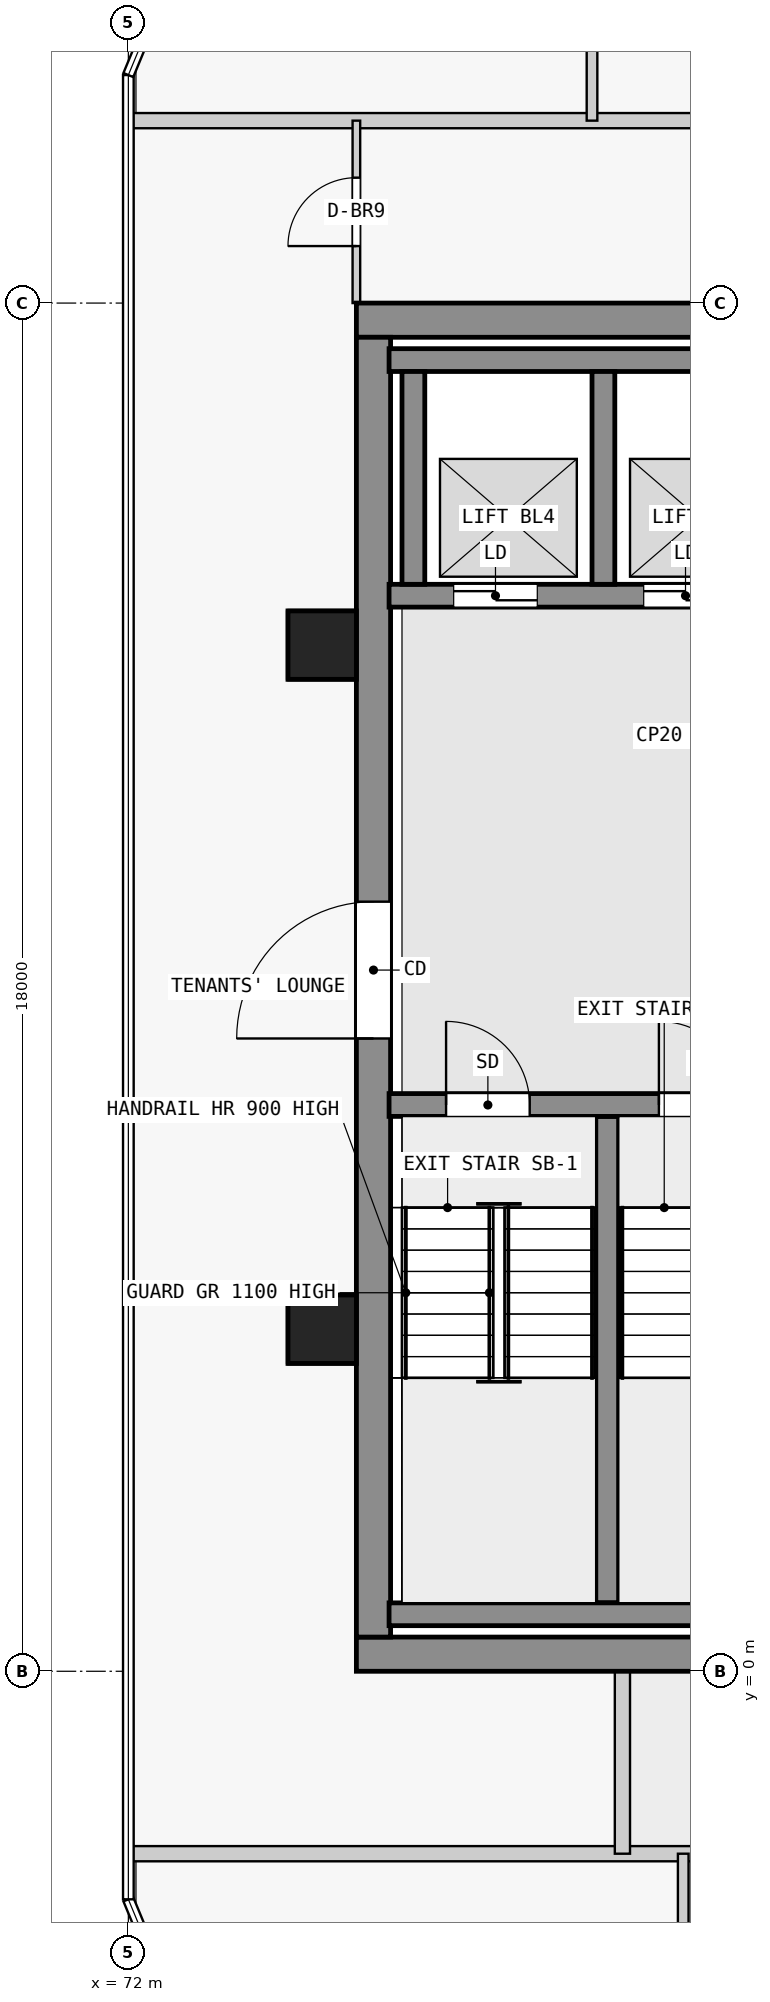
"""IFC4 building model, lengths in metres.
Left out: names, types, materials, properties, quantities, classifications, styles, units other than length and angle.
Written with IfcOpenShell. Run it as: python <this file> out.ifc"""

import sys

from ifc_helpers import new_model, si_unit, direction, frame, frame_2d, origin, origin_2d, place, context, subcontext, project, spatial, rectangle, extrude, element, fill, save


model = new_model("IFC4")
c1 = context("Model", 3, precision=1e-05, world=origin(), true_north=direction((0.0, 1.0)))
c2 = subcontext(c1, "Body", "Model", "MODEL_VIEW")
j1 = project(units=[si_unit("LENGTHUNIT", "METRE"), si_unit("PLANEANGLEUNIT", "RADIAN")], contexts=[c1])
p1 = place(None, origin())
s1 = spatial("IfcSite", under=j1, at=p1, CompositionType="ELEMENT")
p2 = place(p1, origin())
s2 = spatial("IfcBuilding", under=s1, at=p2, CompositionType="ELEMENT")
p3 = place(p2, frame((0.0, 0.0, 72.3)))
s3 = spatial("IfcBuildingStorey", under=s2, at=p3, CompositionType="ELEMENT", Elevation=72.3)
for number, where, z_axis, x_axis in (
    (1, (74.55, 13.5, 0.0), (0.0, 0.0, 1.0), (1.0, 0.0, 0.0)),
    (2, (74.55, 4.5, 0.0), (0.0, 0.0, 1.0), (1.0, 0.0, 0.0)),
):
    element("IfcColumn", number, at=place(p3, frame(where, z_axis=z_axis, x_axis=x_axis)), inside=s3, PredefinedType="COLUMN", context=c2, shape_type="SweptSolid", body=[
        extrude(rectangle(XDim=0.9, YDim=0.9, at=origin_2d()), origin(), (0.0, 0.0, 1.0), 6.0),
    ])
for number, where, z_axis, x_axis in (
    (3, (75.0, 0.225, 0.0), (0.0, 0.0, 1.0), (1.0, 0.0, 0.0)),
    (4, (75.0, 17.775, 0.0), (0.0, 0.0, 1.0), (1.0, 0.0, 0.0)),
):
    element("IfcWall", number, at=place(p3, frame(where, z_axis=z_axis, x_axis=x_axis)), inside=s3, PredefinedType="SHEAR", context=c2, shape_type="SweptSolid", body=[
        extrude(rectangle(XDim=14.5, YDim=0.45, at=frame_2d((7.25, 0.0))), origin(), (0.0, 0.0, 1.0), 5.75),
    ])
p4 = place(p3, frame((75.225, 0.45, 0.0), z_axis=(0.0, 0.0, 1.0), x_axis=(0.0, 1.0, 0.0)))
e5 = element("IfcWall", 5, at=p4, inside=s3, PredefinedType="SHEAR", context=c2, shape_type="SweptSolid", body=[
    extrude(rectangle(XDim=17.1, YDim=0.45, at=frame_2d((8.55, 0.0))), origin(), (0.0, 0.0, 1.0), 5.75),
])
p5 = place(p4, frame((7.875, 0.0, 0.0)))
e6 = element("IfcOpeningElement", 6, at=p5, cuts=e5, PredefinedType="OPENING", context=c2, shape_type="SweptSolid", body=[
    extrude(rectangle(XDim=1.8, YDim=2.1, at=frame_2d((0.9, 1.05))), frame((0.0, 0.235, 0.0), z_axis=(0.0, -1.0, 0.0), x_axis=(1.0, 0.0, 0.0)), (0.0, 0.0, 1.0), 0.47),
])
p6 = place(p3, frame((75.43, 0.75, 0.0), z_axis=(0.0, 0.0, 1.0), x_axis=(1.0, 0.0, 0.0)))
e7 = element("IfcWall", 7, at=p6, inside=s3, PredefinedType="SHEAR", context=c2, shape_type="SweptSolid", body=[
    extrude(rectangle(XDim=5.87, YDim=0.3, at=frame_2d((2.935, 0.0))), origin(), (0.0, 0.0, 1.0), 5.75),
])
p7 = place(p3, frame((75.43, 7.45, 0.0), z_axis=(0.0, 0.0, 1.0), x_axis=(1.0, 0.0, 0.0)))
e8 = element("IfcWall", 8, at=p7, inside=s3, PredefinedType="SHEAR", context=c2, shape_type="SweptSolid", body=[
    extrude(rectangle(XDim=5.87, YDim=0.3, at=frame_2d((2.935, 0.0))), origin(), (0.0, 0.0, 1.0), 5.75),
])
p8 = place(p7, frame((0.75, 0.0, 0.0)))
e9 = element("IfcOpeningElement", 9, at=p8, cuts=e8, PredefinedType="OPENING", context=c2, shape_type="SweptSolid", body=[
    extrude(rectangle(XDim=1.1, YDim=2.1, at=frame_2d((0.55, 1.05))), frame((0.0, 0.16, 0.0), z_axis=(0.0, -1.0, 0.0), x_axis=(1.0, 0.0, 0.0)), (0.0, 0.0, 1.0), 0.32),
])
p9 = place(p7, frame((3.55, 0.0, 0.0)))
e10 = element("IfcOpeningElement", 10, at=p9, cuts=e8, PredefinedType="OPENING", context=c2, shape_type="SweptSolid", body=[
    extrude(rectangle(XDim=1.1, YDim=2.1, at=frame_2d((0.55, 1.05))), frame((0.0, 0.16, 0.0), z_axis=(0.0, -1.0, 0.0), x_axis=(1.0, 0.0, 0.0)), (0.0, 0.0, 1.0), 0.32),
])
p10 = place(p3, frame((78.3, 0.9, 0.0), z_axis=(0.0, 0.0, 1.0), x_axis=(0.0, 1.0, 0.0)))
e11 = element("IfcWall", 11, at=p10, inside=s3, PredefinedType="SHEAR", context=c2, shape_type="SweptSolid", body=[
    extrude(rectangle(XDim=6.4, YDim=0.3, at=frame_2d((3.2, 0.0))), origin(), (0.0, 0.0, 1.0), 5.75),
])
p11 = place(p3, frame((75.43, 17.25, 0.0), z_axis=(0.0, 0.0, 1.0), x_axis=(1.0, 0.0, 0.0)))
e12 = element("IfcWall", 12, at=p11, inside=s3, PredefinedType="SHEAR", context=c2, shape_type="SweptSolid", body=[
    extrude(rectangle(XDim=10.07, YDim=0.3, at=frame_2d((5.035, 0.0))), origin(), (0.0, 0.0, 1.0), 5.75),
])
p12 = place(p3, frame((75.43, 14.15, 0.0), z_axis=(0.0, 0.0, 1.0), x_axis=(1.0, 0.0, 0.0)))
e13 = element("IfcWall", 13, at=p12, inside=s3, PredefinedType="SHEAR", context=c2, shape_type="SweptSolid", body=[
    extrude(rectangle(XDim=10.07, YDim=0.3, at=frame_2d((5.035, 0.0))), origin(), (0.0, 0.0, 1.0), 5.75),
])
p13 = place(p12, frame((0.85, 0.0, 0.0)))
e14 = element("IfcOpeningElement", 14, at=p13, cuts=e13, PredefinedType="OPENING", context=c2, shape_type="SweptSolid", body=[
    extrude(rectangle(XDim=1.1, YDim=2.1, at=frame_2d((0.55, 1.05))), frame((0.0, 0.16, 0.0), z_axis=(0.0, -1.0, 0.0), x_axis=(1.0, 0.0, 0.0)), (0.0, 0.0, 1.0), 0.32),
])
p14 = place(p12, frame((3.35, 0.0, 0.0)))
e15 = element("IfcOpeningElement", 15, at=p14, cuts=e13, PredefinedType="OPENING", context=c2, shape_type="SweptSolid", body=[
    extrude(rectangle(XDim=1.1, YDim=2.1, at=frame_2d((0.55, 1.05))), frame((0.0, 0.16, 0.0), z_axis=(0.0, -1.0, 0.0), x_axis=(1.0, 0.0, 0.0)), (0.0, 0.0, 1.0), 0.32),
])
p15 = place(p12, frame((5.75, 0.0, 0.0)))
e16 = element("IfcOpeningElement", 16, at=p15, cuts=e13, PredefinedType="OPENING", context=c2, shape_type="SweptSolid", body=[
    extrude(rectangle(XDim=1.1, YDim=2.1, at=frame_2d((0.55, 1.05))), frame((0.0, 0.16, 0.0), z_axis=(0.0, -1.0, 0.0), x_axis=(1.0, 0.0, 0.0)), (0.0, 0.0, 1.0), 0.32),
])
p16 = place(p12, frame((8.05, 0.0, 0.0)))
e17 = element("IfcOpeningElement", 17, at=p16, cuts=e13, PredefinedType="OPENING", context=c2, shape_type="SweptSolid", body=[
    extrude(rectangle(XDim=1.1, YDim=2.1, at=frame_2d((0.55, 1.05))), frame((0.0, 0.16, 0.0), z_axis=(0.0, -1.0, 0.0), x_axis=(1.0, 0.0, 0.0)), (0.0, 0.0, 1.0), 0.32),
])
for number, where, z_axis, x_axis in (
    (18, (75.75, 14.3, 0.0), (0.0, 0.0, 1.0), (0.0, 1.0, 0.0)),
    (19, (78.25, 14.3, 0.0), (0.0, 0.0, 1.0), (0.0, 1.0, 0.0)),
):
    element("IfcWall", number, at=place(p3, frame(where, z_axis=z_axis, x_axis=x_axis)), inside=s3, PredefinedType="SHEAR", context=c2, shape_type="SweptSolid", body=[
        extrude(rectangle(XDim=2.8, YDim=0.3, at=frame_2d((1.4, 0.0))), origin(), (0.0, 0.0, 1.0), 5.75),
    ])
p17 = place(p3, frame((72.0, -2.4, 0.0), z_axis=(0.0, 0.0, 1.0), x_axis=(1.0, 0.0, 0.0)))
e20 = element("IfcWall", 20, at=p17, inside=s3, PredefinedType="PARTITIONING", context=c2, shape_type="SweptSolid", body=[
    extrude(rectangle(XDim=20.0, YDim=0.2, at=frame_2d((10.0, 0.0))), origin(), (0.0, 0.0, 1.0), 5.75),
])
p18 = place(p17, frame((11.5, 0.0, 0.0)))
e21 = element("IfcOpeningElement", 21, at=p18, cuts=e20, PredefinedType="OPENING", context=c2, shape_type="SweptSolid", body=[
    extrude(rectangle(XDim=1.0, YDim=2.4, at=frame_2d((0.5, 1.2))), frame((0.0, 0.11, 0.0), z_axis=(0.0, -1.0, 0.0), x_axis=(1.0, 0.0, 0.0)), (0.0, 0.0, 1.0), 0.22),
])
p19 = place(p3, frame((72.0, 20.4, 0.0), z_axis=(0.0, 0.0, 1.0), x_axis=(1.0, 0.0, 0.0)))
e22 = element("IfcWall", 22, at=p19, inside=s3, PredefinedType="PARTITIONING", context=c2, shape_type="SweptSolid", body=[
    extrude(rectangle(XDim=20.0, YDim=0.2, at=frame_2d((10.0, 0.0))), origin(), (0.0, 0.0, 1.0), 5.75),
])
p20 = place(p3, frame((78.5, -2.4, 0.0), z_axis=(0.0, 0.0, 1.0), x_axis=(0.0, 1.0, 0.0)))
e23 = element("IfcWall", 23, at=p20, inside=s3, PredefinedType="PARTITIONING", context=c2, shape_type="SweptSolid", body=[
    extrude(rectangle(XDim=2.4, YDim=0.2, at=frame_2d((1.2, 0.0))), origin(), (0.0, 0.0, 1.0), 5.75),
])
p21 = place(p3, frame((75.0, 18.0, 0.0), z_axis=(0.0, 0.0, 1.0), x_axis=(0.0, 1.0, 0.0)))
e24 = element("IfcWall", 24, at=p21, inside=s3, PredefinedType="PARTITIONING", context=c2, shape_type="SweptSolid", body=[
    extrude(rectangle(XDim=2.4, YDim=0.1, at=frame_2d((1.2, 0.0))), origin(), (0.0, 0.0, 1.0), 5.75),
])
p22 = place(p21, frame((0.75, 0.0, 0.0)))
e25 = element("IfcOpeningElement", 25, at=p22, cuts=e24, PredefinedType="OPENING", context=c2, shape_type="SweptSolid", body=[
    extrude(rectangle(XDim=0.9, YDim=2.1, at=frame_2d((0.45, 1.05))), frame((0.0, 0.06, 0.0), z_axis=(0.0, -1.0, 0.0), x_axis=(1.0, 0.0, 0.0)), (0.0, 0.0, 1.0), 0.12),
])
p23 = place(p3, frame((79.3, -6.0, 0.0), z_axis=(0.0, 0.0, 1.0), x_axis=(0.0, 1.0, 0.0)))
e26 = element("IfcWall", 26, at=p23, inside=s3, PredefinedType="PARTITIONING", context=c2, shape_type="SweptSolid", body=[
    extrude(rectangle(XDim=3.6, YDim=0.14, at=frame_2d((1.8, 0.0))), origin(), (0.0, 0.0, 1.0), 5.75),
])
p24 = place(p23, frame((1.35, 0.0, 0.0)))
e27 = element("IfcOpeningElement", 27, at=p24, cuts=e26, PredefinedType="OPENING", context=c2, shape_type="SweptSolid", body=[
    extrude(rectangle(XDim=0.9, YDim=2.4, at=frame_2d((0.45, 1.2))), frame((0.0, 0.08, 0.0), z_axis=(0.0, -1.0, 0.0), x_axis=(1.0, 0.0, 0.0)), (0.0, 0.0, 1.0), 0.16),
])
p25 = place(p3, frame((78.1, 20.4, 0.0), z_axis=(0.0, 0.0, 1.0), x_axis=(0.0, 1.0, 0.0)))
e28 = element("IfcWall", 28, at=p25, inside=s3, PredefinedType="PARTITIONING", context=c2, shape_type="SweptSolid", body=[
    extrude(rectangle(XDim=3.6, YDim=0.14, at=frame_2d((1.8, 0.0))), origin(), (0.0, 0.0, 1.0), 5.75),
])
p26 = place(p25, frame((1.35, 0.0, 0.0)))
e29 = element("IfcOpeningElement", 29, at=p26, cuts=e28, PredefinedType="OPENING", context=c2, shape_type="SweptSolid", body=[
    extrude(rectangle(XDim=0.9, YDim=2.4, at=frame_2d((0.45, 1.2))), frame((0.0, 0.08, 0.0), z_axis=(0.0, -1.0, 0.0), x_axis=(1.0, 0.0, 0.0)), (0.0, 0.0, 1.0), 0.16),
])
p27 = place(p13, origin())
e30 = element("IfcDoor", 30, at=p27, inside=s3, OperationType="DOUBLE_DOOR_SLIDING", PredefinedType="DOOR", context=c2, shape_type="SweptSolid", body=[
    extrude(rectangle(XDim=1.1, YDim=2.1, at=frame_2d((0.55, 1.05))), frame((0.0, 0.025, 0.0), z_axis=(0.0, -1.0, 0.0), x_axis=(1.0, 0.0, 0.0)), (0.0, 0.0, 1.0), 0.05),
])
fill(e14, e30)
p28 = place(p14, origin())
e31 = element("IfcDoor", 31, at=p28, inside=s3, OperationType="DOUBLE_DOOR_SLIDING", PredefinedType="DOOR", context=c2, shape_type="SweptSolid", body=[
    extrude(rectangle(XDim=1.1, YDim=2.1, at=frame_2d((0.55, 1.05))), frame((0.0, 0.025, 0.0), z_axis=(0.0, -1.0, 0.0), x_axis=(1.0, 0.0, 0.0)), (0.0, 0.0, 1.0), 0.05),
])
fill(e15, e31)
p29 = place(p8, origin())
e32 = element("IfcDoor", 32, at=p29, inside=s3, OperationType="SINGLE_SWING_RIGHT", PredefinedType="DOOR", context=c2, shape_type="SweptSolid", body=[
    extrude(rectangle(XDim=1.1, YDim=2.1, at=frame_2d((0.55, 1.05))), frame((0.0, 0.025, 0.0), z_axis=(0.0, -1.0, 0.0), x_axis=(1.0, 0.0, 0.0)), (0.0, 0.0, 1.0), 0.05),
])
fill(e9, e32)
p30 = place(p9, origin())
e33 = element("IfcDoor", 33, at=p30, inside=s3, OperationType="SINGLE_SWING_LEFT", PredefinedType="DOOR", context=c2, shape_type="SweptSolid", body=[
    extrude(rectangle(XDim=1.1, YDim=2.1, at=frame_2d((0.55, 1.05))), frame((0.0, 0.025, 0.0), z_axis=(0.0, -1.0, 0.0), x_axis=(1.0, 0.0, 0.0)), (0.0, 0.0, 1.0), 0.05),
])
fill(e10, e33)
p31 = place(p5, origin())
e34 = element("IfcDoor", 34, at=p31, inside=s3, OperationType="DOUBLE_DOOR_SINGLE_SWING", PredefinedType="DOOR", context=c2, shape_type="SweptSolid", body=[
    extrude(rectangle(XDim=1.8, YDim=2.1, at=frame_2d((0.9, 1.05))), frame((0.0, 0.025, 0.0), z_axis=(0.0, -1.0, 0.0), x_axis=(1.0, 0.0, 0.0)), (0.0, 0.0, 1.0), 0.05),
])
fill(e6, e34)
p32 = place(p22, origin())
e35 = element("IfcDoor", 35, at=p32, inside=s3, OperationType="SINGLE_SWING_LEFT", PredefinedType="DOOR", context=c2, shape_type="SweptSolid", body=[
    extrude(rectangle(XDim=0.9, YDim=2.1, at=frame_2d((0.45, 1.05))), frame((0.0, 0.025, 0.0), z_axis=(0.0, -1.0, 0.0), x_axis=(1.0, 0.0, 0.0)), (0.0, 0.0, 1.0), 0.05),
])
fill(e25, e35)
save(model, sys.argv[1])
